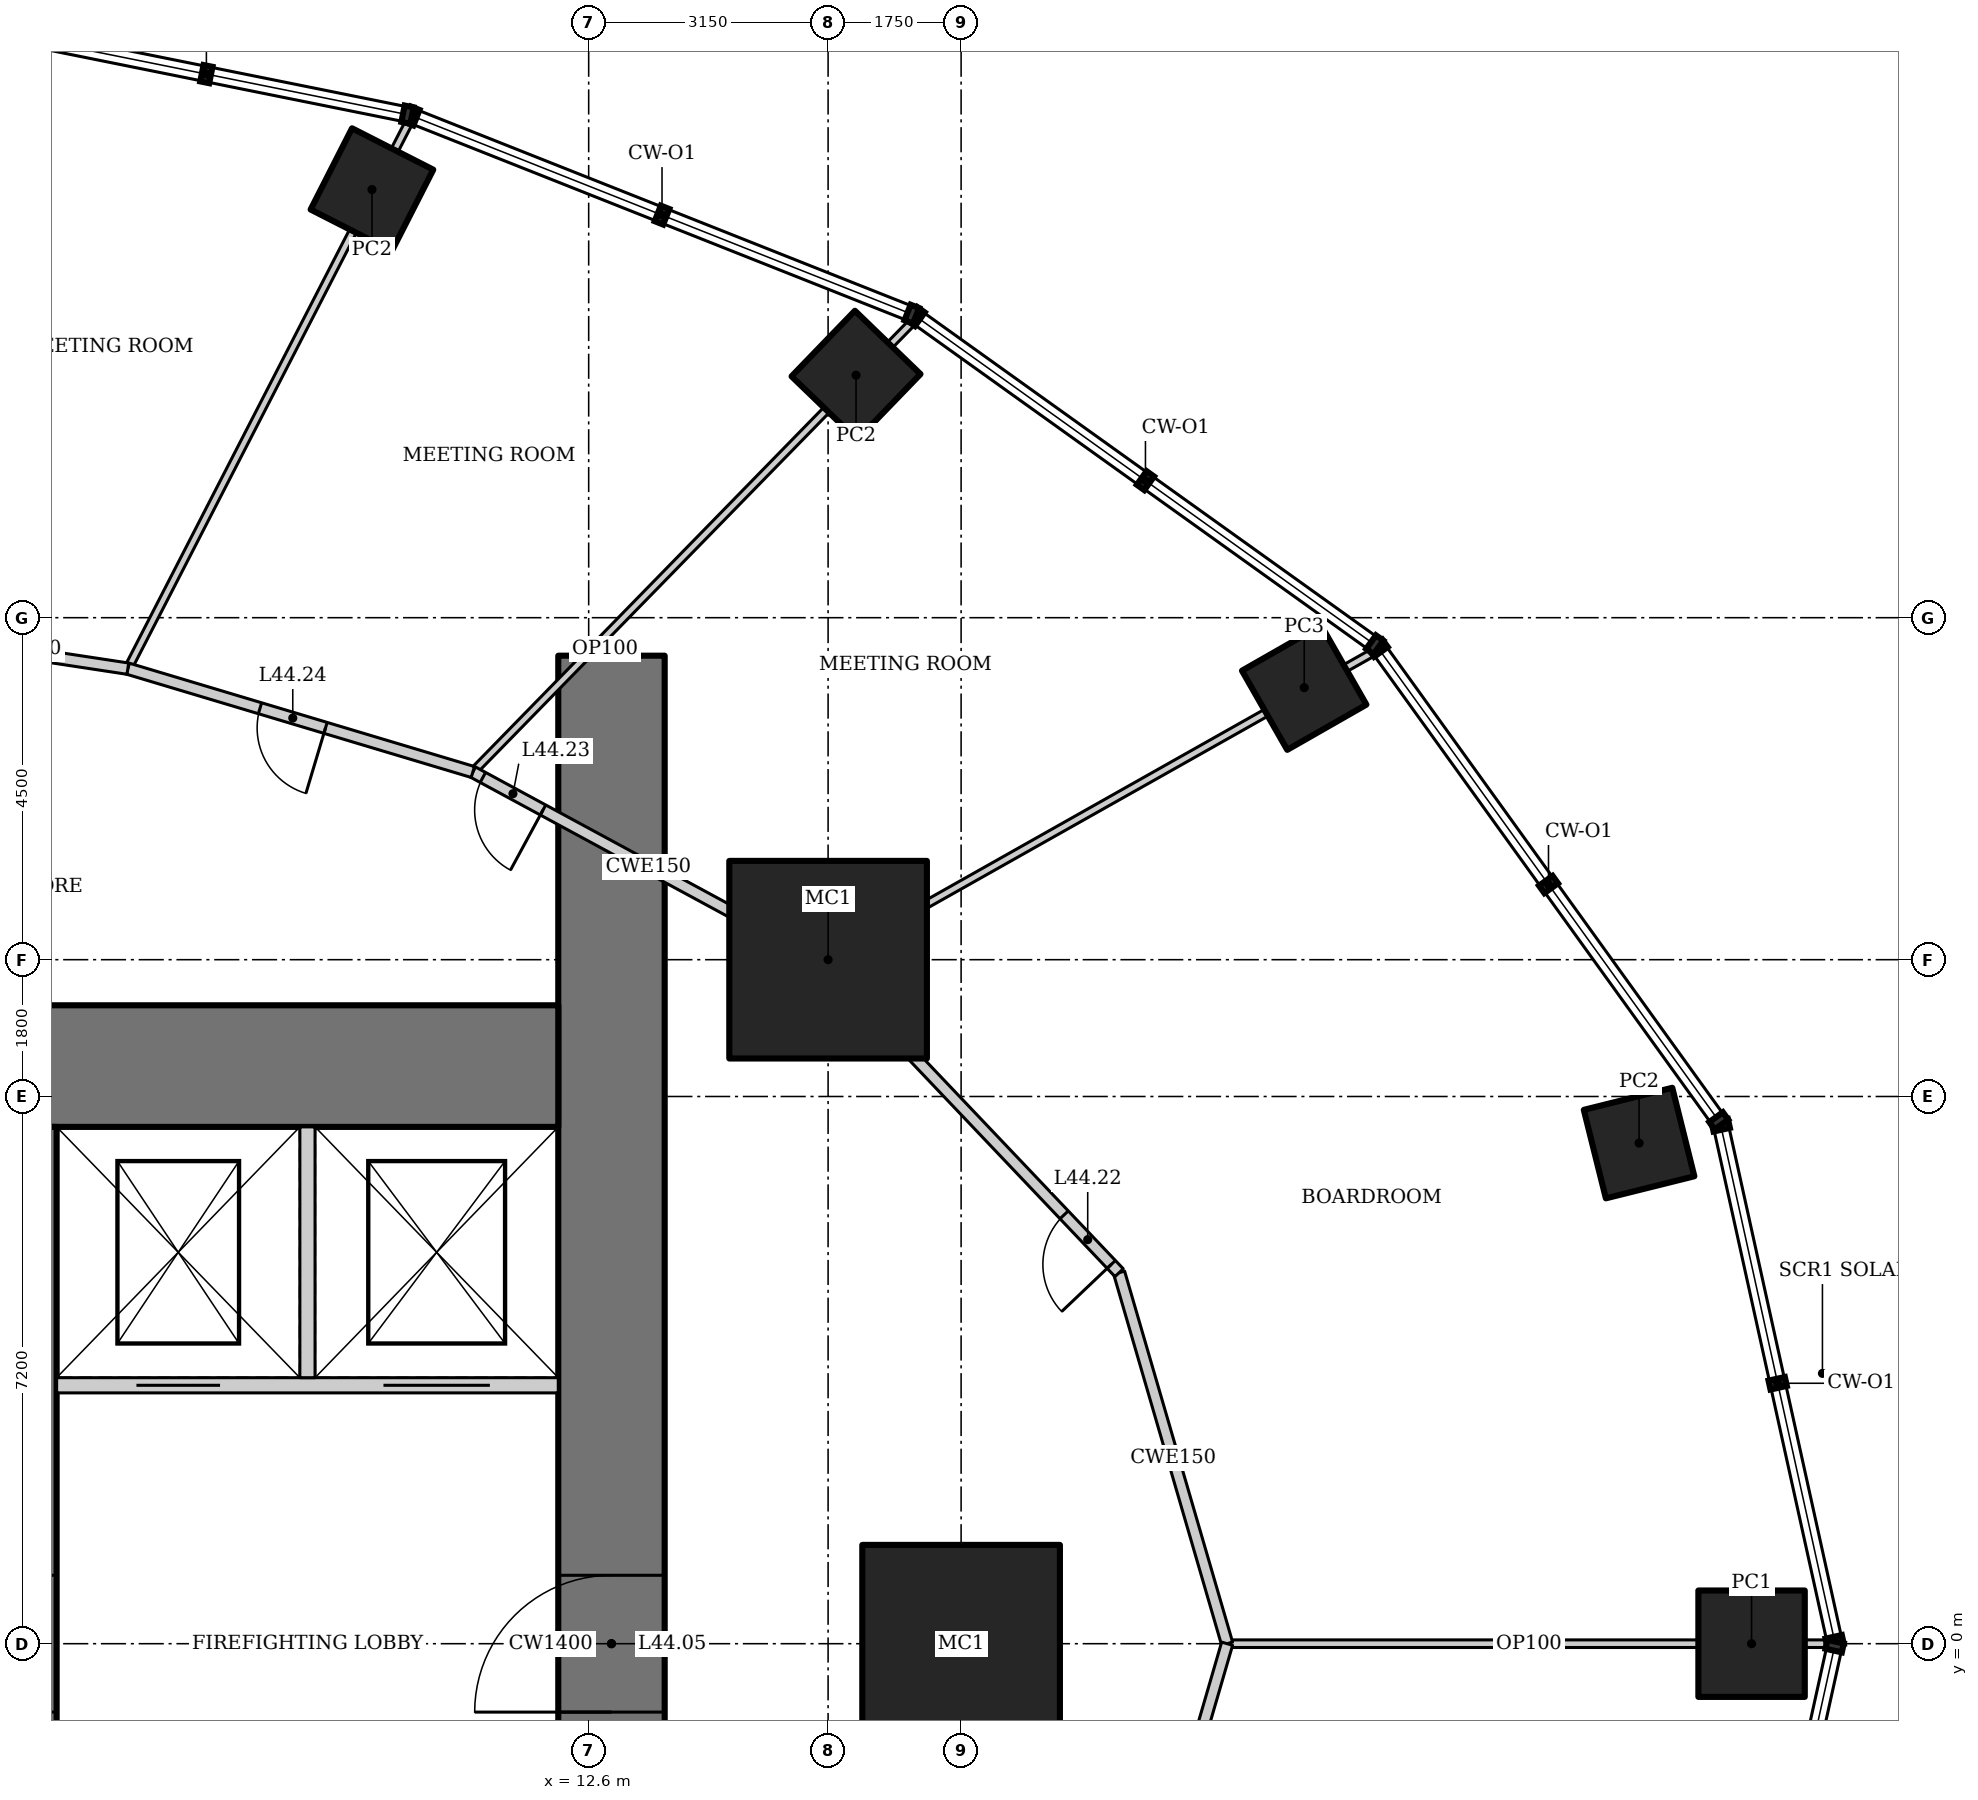
"""IFC4 building model, lengths in metres.
Left out: names, types, materials, properties, quantities, classifications, styles, units other than length and angle.
Written with IfcOpenShell. Run it as: python <this file> out.ifc"""

import sys

from ifc_helpers import new_model, si_unit, direction, frame, frame_2d, origin, origin_2d, place, context, subcontext, project, spatial, rectangle, hollow_rectangle, extrude, element, fill, save


model = new_model("IFC4")
c1 = context("Model", 3, precision=1e-05, world=origin(), true_north=direction((0.0, 1.0)))
c2 = subcontext(c1, "Body", "Model", "MODEL_VIEW")
j1 = project(units=[si_unit("LENGTHUNIT", "METRE"), si_unit("PLANEANGLEUNIT", "RADIAN")], contexts=[c1])
p1 = place(None, origin())
s1 = spatial("IfcSite", under=j1, at=p1, CompositionType="ELEMENT")
p2 = place(p1, origin())
s2 = spatial("IfcBuilding", under=s1, at=p2, CompositionType="ELEMENT")
p3 = place(p2, frame((0.0, 0.0, 188.8)))
s3 = spatial("IfcBuildingStorey", under=s2, at=p3, CompositionType="ELEMENT", Elevation=188.8)
for number, where, z_axis, x_axis in (
    (1, (17.5, 0.0, 0.0), (0.0, 0.0, 1.0), (1.0, 0.0, 0.0)),
    (2, (15.75, 9.0, 0.0), (0.0, 0.0, 1.0), (1.0, 0.0, 0.0)),
):
    element("IfcColumn", number, at=place(p3, frame(where, z_axis=z_axis, x_axis=x_axis)), inside=s3, PredefinedType="COLUMN", context=c2, shape_type="SweptSolid", body=[
        extrude(hollow_rectangle(XDim=2.6, YDim=2.6, WallThickness=0.13, at=origin_2d()), origin(), (0.0, 0.0, 1.0), 4.2),
    ])
p4 = place(p3, frame((27.9, 0.0, 0.0), z_axis=(0.0, 0.0, 1.0), x_axis=(1.0, 0.0, 0.0)))
e3 = element("IfcColumn", 3, at=p4, inside=s3, PredefinedType="COLUMN", context=c2, shape_type="SweptSolid", body=[
    extrude(hollow_rectangle(XDim=1.4, YDim=1.4, WallThickness=0.1, at=origin_2d()), origin(), (0.0, 0.0, 1.0), 2.66),
])
p5 = place(p3, frame((26.42, 6.587, 0.0), z_axis=(0.0, 0.0, 1.0), x_axis=(0.970295726276, 0.2419218956, 0.0)))
e4 = element("IfcColumn", 4, at=p5, inside=s3, PredefinedType="COLUMN", context=c2, shape_type="SweptSolid", body=[
    extrude(hollow_rectangle(XDim=1.2, YDim=1.2, WallThickness=0.1, at=origin_2d()), origin(), (0.0, 0.0, 1.0), 2.88),
])
p6 = place(p3, frame((22.014, 12.579, 0.0), z_axis=(0.0, 0.0, 1.0), x_axis=(0.86824298017, 0.496139221777, 0.0)))
e5 = element("IfcColumn", 5, at=p6, inside=s3, PredefinedType="COLUMN", context=c2, shape_type="SweptSolid", body=[
    extrude(hollow_rectangle(XDim=1.2, YDim=1.2, WallThickness=0.12, at=origin_2d()), origin(), (0.0, 0.0, 1.0), 2.88),
])
for number, where, z_axis, x_axis in (
    (6, (16.118, 16.69, 0.0), (0.0, 0.0, 1.0), (0.695, 0.719, 0.0)),
    (7, (9.749, 19.133, 0.0), (0.0, 0.0, 1.0), (0.454, 0.891, 0.0)),
):
    element("IfcColumn", number, at=place(p3, frame(where, z_axis=z_axis, x_axis=x_axis)), inside=s3, PredefinedType="COLUMN", context=c2, shape_type="SweptSolid", body=[
        extrude(hollow_rectangle(XDim=1.2, YDim=1.2, WallThickness=0.1, at=origin_2d()), origin(), (0.0, 0.0, 1.0), 2.88),
    ])
p7 = place(p3, frame((12.9, -13.0, 0.0), z_axis=(0.0, 0.0, 1.0), x_axis=(0.0, 1.0, 0.0)))
e8 = element("IfcWall", 8, at=p7, inside=s3, PredefinedType="SHEAR", context=c2, shape_type="SweptSolid", body=[
    extrude(rectangle(XDim=26.0, YDim=1.4, at=frame_2d((13.0, 0.0))), origin(), (0.0, 0.0, 1.0), 4.2),
])
p8 = place(p7, frame((12.1, 0.0, 0.0)))
e9 = element("IfcOpeningElement", 9, at=p8, cuts=e8, PredefinedType="OPENING", context=c2, shape_type="SweptSolid", body=[
    extrude(rectangle(XDim=1.8, YDim=2.1, at=frame_2d((0.9, 1.05))), frame((0.0, 0.71, 0.0), z_axis=(0.0, -1.0, 0.0), x_axis=(1.0, 0.0, 0.0)), (0.0, 0.0, 1.0), 1.42),
])
p9 = place(p3, frame((12.2, 7.6, 0.0), z_axis=(0.0, 0.0, 1.0), x_axis=(-1.0, 0.0, 0.0)))
e10 = element("IfcWall", 10, at=p9, inside=s3, PredefinedType="SHEAR", context=c2, shape_type="SweptSolid", body=[
    extrude(rectangle(XDim=24.4, YDim=1.6, at=frame_2d((12.2, 0.0))), origin(), (0.0, 0.0, 1.0), 4.2),
])
p10 = place(p3, frame((5.4, -6.8, 0.0), z_axis=(0.0, 0.0, 1.0), x_axis=(0.0, 1.0, 0.0)))
e11 = element("IfcWall", 11, at=p10, inside=s3, PredefinedType="SHEAR", context=c2, shape_type="SweptSolid", body=[
    extrude(rectangle(XDim=13.6, YDim=0.4, at=frame_2d((6.8, 0.0))), origin(), (0.0, 0.0, 1.0), 4.2),
])
p11 = place(p10, frame((5.9, 0.0, 0.0)))
e12 = element("IfcOpeningElement", 12, at=p11, cuts=e11, PredefinedType="OPENING", context=c2, shape_type="SweptSolid", body=[
    extrude(rectangle(XDim=1.8, YDim=2.1, at=frame_2d((0.9, 1.05))), frame((0.0, 0.21, 0.0), z_axis=(0.0, -1.0, 0.0), x_axis=(1.0, 0.0, 0.0)), (0.0, 0.0, 1.0), 0.42),
])
p12 = place(p3, frame((12.2, 3.4, 0.0), z_axis=(0.0, 0.0, 1.0), x_axis=(-1.0, 0.0, 0.0)))
e13 = element("IfcWall", 13, at=p12, inside=s3, PredefinedType="SOLIDWALL", context=c2, shape_type="SweptSolid", body=[
    extrude(rectangle(XDim=6.6, YDim=0.2, at=frame_2d((3.3, 0.0))), origin(), (0.0, 0.0, 1.0), 4.2),
])
p13 = place(p12, frame((4.45, 0.0, 0.0)))
e14 = element("IfcOpeningElement", 14, at=p13, cuts=e13, PredefinedType="OPENING", context=c2, shape_type="SweptSolid", body=[
    extrude(rectangle(XDim=1.1, YDim=2.2, at=frame_2d((0.55, 1.1))), frame((0.0, 0.11, 0.0), z_axis=(0.0, -1.0, 0.0), x_axis=(1.0, 0.0, 0.0)), (0.0, 0.0, 1.0), 0.22),
])
p14 = place(p12, frame((0.9, 0.0, 0.0)))
e15 = element("IfcOpeningElement", 15, at=p14, cuts=e13, PredefinedType="OPENING", context=c2, shape_type="SweptSolid", body=[
    extrude(rectangle(XDim=1.4, YDim=2.2, at=frame_2d((0.7, 1.1))), frame((0.0, 0.11, 0.0), z_axis=(0.0, -1.0, 0.0), x_axis=(1.0, 0.0, 0.0)), (0.0, 0.0, 1.0), 0.22),
])
p15 = place(p3, frame((8.9, 3.5, 0.0), z_axis=(0.0, 0.0, 1.0), x_axis=(0.0, 1.0, 0.0)))
e16 = element("IfcWall", 16, at=p15, inside=s3, PredefinedType="SOLIDWALL", context=c2, shape_type="SweptSolid", body=[
    extrude(rectangle(XDim=3.3, YDim=0.2, at=frame_2d((1.65, 0.0))), origin(), (0.0, 0.0, 1.0), 4.2),
])
p16 = place(p3, frame((28.944, 0.0, 0.0), z_axis=(0.0, 0.0, 1.0), x_axis=(-1.0, 0.0, 0.0)))
e17 = element("IfcWall", 17, at=p16, inside=s3, PredefinedType="PARTITIONING", context=c2, shape_type="SweptSolid", body=[
    extrude(rectangle(XDim=7.944, YDim=0.1, at=frame_2d((3.972, 0.0))), origin(), (0.0, 0.0, 1.0), 2.8),
])
p17 = place(p3, frame((22.949, 13.059, 0.0), z_axis=(0.0, 0.0, 1.0), x_axis=(-0.871079462611, -0.491142107558, 0.0)))
e18 = element("IfcWall", 18, at=p17, inside=s3, PredefinedType="PARTITIONING", context=c2, shape_type="SweptSolid", body=[
    extrude(rectangle(XDim=8.327, YDim=0.1, at=frame_2d((4.164, 0.0))), origin(), (0.0, 0.0, 1.0), 2.8),
])
p18 = place(p3, frame((16.882, 17.414, 0.0), z_axis=(0.0, 0.0, 1.0), x_axis=(-0.698758056249, -0.715358077348, 0.0)))
e19 = element("IfcWall", 19, at=p18, inside=s3, PredefinedType="PARTITIONING", context=c2, shape_type="SweptSolid", body=[
    extrude(rectangle(XDim=8.31, YDim=0.1, at=frame_2d((4.155, 0.0))), origin(), (0.0, 0.0, 1.0), 3.058),
])
p19 = place(p3, frame((10.253, 20.052, 0.0), z_axis=(0.0, 0.0, 1.0), x_axis=(-0.457535449567, -0.889191381194, 0.0)))
e20 = element("IfcWall", 20, at=p19, inside=s3, PredefinedType="PARTITIONING", context=c2, shape_type="SweptSolid", body=[
    extrude(rectangle(XDim=8.123, YDim=0.1, at=frame_2d((4.061, 0.0))), origin(), (0.0, 0.0, 1.0), 3.228),
])
p20 = place(p3, frame((21.0, 0.0, 0.0), z_axis=(0.0, 0.0, 1.0), x_axis=(-0.279474430869, 0.960153134917, 0.0)))
e21 = element("IfcWall", 21, at=p20, inside=s3, PredefinedType="PARTITIONING", context=c2, shape_type="SweptSolid", body=[
    extrude(rectangle(XDim=5.084, YDim=0.15, at=frame_2d((2.542, 0.0))), origin(), (0.0, 0.0, 1.0), 4.0),
])
p21 = place(p3, frame((19.579, 4.882, 0.0), z_axis=(0.0, 0.0, 1.0), x_axis=(-0.688797257101, 0.72495402517, 0.0)))
e22 = element("IfcWall", 22, at=p21, inside=s3, PredefinedType="PARTITIONING", context=c2, shape_type="SweptSolid", body=[
    extrude(rectangle(XDim=5.638, YDim=0.15, at=frame_2d((2.819, 0.0))), origin(), (0.0, 0.0, 1.0), 4.0),
])
p22 = place(p21, frame((0.15, 0.0, 0.0)))
e23 = element("IfcOpeningElement", 23, at=p22, cuts=e22, PredefinedType="OPENING", context=c2, shape_type="SweptSolid", body=[
    extrude(rectangle(XDim=0.9, YDim=2.1, at=frame_2d((0.45, 1.05))), frame((0.0, 0.085, 0.0), z_axis=(0.0, -1.0, 0.0), x_axis=(1.0, 0.0, 0.0)), (0.0, 0.0, 1.0), 0.17),
])
p23 = place(p3, frame((15.696, 8.969, 0.0), z_axis=(0.0, 0.0, 1.0), x_axis=(-0.879436285334, 0.476016617397, 0.0)))
e24 = element("IfcWall", 24, at=p23, inside=s3, PredefinedType="PARTITIONING", context=c2, shape_type="SweptSolid", body=[
    extrude(rectangle(XDim=5.253, YDim=0.15, at=frame_2d((2.626, 0.0))), origin(), (0.0, 0.0, 1.0), 4.0),
])
p24 = place(p23, frame((4.203, 0.0, 0.0)))
e25 = element("IfcOpeningElement", 25, at=p24, cuts=e24, PredefinedType="OPENING", context=c2, shape_type="SweptSolid", body=[
    extrude(rectangle(XDim=0.9, YDim=2.1, at=frame_2d((0.45, 1.05))), frame((0.0, 0.085, 0.0), z_axis=(0.0, -1.0, 0.0), x_axis=(1.0, 0.0, 0.0)), (0.0, 0.0, 1.0), 0.17),
])
p25 = place(p3, frame((11.076, 11.469, 0.0), z_axis=(0.0, 0.0, 1.0), x_axis=(-0.957933992798, 0.286988615527, 0.0)))
e26 = element("IfcWall", 26, at=p25, inside=s3, PredefinedType="PARTITIONING", context=c2, shape_type="SweptSolid", body=[
    extrude(rectangle(XDim=4.738, YDim=0.15, at=frame_2d((2.369, 0.0))), origin(), (0.0, 0.0, 1.0), 4.0),
])
p26 = place(p25, frame((2.023, 0.0, 0.0)))
e27 = element("IfcOpeningElement", 27, at=p26, cuts=e26, PredefinedType="OPENING", context=c2, shape_type="SweptSolid", body=[
    extrude(rectangle(XDim=0.9, YDim=2.1, at=frame_2d((0.45, 1.05))), frame((0.0, 0.085, 0.0), z_axis=(0.0, -1.0, 0.0), x_axis=(1.0, 0.0, 0.0)), (0.0, 0.0, 1.0), 0.17),
])
p27 = place(p3, frame((6.537, 12.829, 0.0), z_axis=(0.0, 0.0, 1.0), x_axis=(-0.988668719464, 0.150113833987, 0.0)))
e28 = element("IfcWall", 28, at=p27, inside=s3, PredefinedType="PARTITIONING", context=c2, shape_type="SweptSolid", body=[
    extrude(rectangle(XDim=3.493, YDim=0.15, at=frame_2d((1.747, 0.0))), origin(), (0.0, 0.0, 1.0), 4.0),
])
p28 = place(p27, frame((2.444, 0.0, 0.0)))
e29 = element("IfcOpeningElement", 29, at=p28, cuts=e28, PredefinedType="OPENING", context=c2, shape_type="SweptSolid", body=[
    extrude(rectangle(XDim=0.9, YDim=2.1, at=frame_2d((0.45, 1.05))), frame((0.0, 0.085, 0.0), z_axis=(0.0, -1.0, 0.0), x_axis=(1.0, 0.0, 0.0)), (0.0, 0.0, 1.0), 0.17),
])
p29 = place(p3, frame((19.579, -4.882, 0.0), z_axis=(0.0, 0.0, 1.0), x_axis=(0.279474430869, 0.960153134917, 0.0)))
e30 = element("IfcWall", 30, at=p29, inside=s3, PredefinedType="PARTITIONING", context=c2, shape_type="SweptSolid", body=[
    extrude(rectangle(XDim=5.084, YDim=0.15, at=frame_2d((2.542, 0.0))), origin(), (0.0, 0.0, 1.0), 4.0),
])
p30 = place(p3, frame((12.9, 13.0, 0.0), z_axis=(0.0, 0.0, 1.0), x_axis=(-0.714845300066, 0.699282630253, 0.0)))
e31 = element("IfcWall", 31, at=p30, inside=s3, PredefinedType="PARTITIONING", context=c2, shape_type="SweptSolid", body=[
    extrude(rectangle(XDim=0.235, YDim=0.1, at=frame_2d((0.118, 0.0))), origin(), (0.0, 0.0, 1.0), 4.0),
])
p31 = place(p8, origin())
e32 = element("IfcDoor", 32, at=p31, inside=s3, OperationType="DOUBLE_DOOR_DOUBLE_SWING", PredefinedType="DOOR", context=c2, shape_type="SweptSolid", body=[
    extrude(rectangle(XDim=1.8, YDim=2.1, at=frame_2d((0.9, 1.05))), frame((0.0, 0.025, 0.0), z_axis=(0.0, -1.0, 0.0), x_axis=(1.0, 0.0, 0.0)), (0.0, 0.0, 1.0), 0.05),
])
fill(e9, e32)
p32 = place(p13, origin())
e33 = element("IfcDoor", 33, at=p32, inside=s3, OperationType="DOUBLE_DOOR_SLIDING", PredefinedType="DOOR", context=c2, shape_type="SweptSolid", body=[
    extrude(rectangle(XDim=1.1, YDim=2.2, at=frame_2d((0.55, 1.1))), frame((0.0, 0.025, 0.0), z_axis=(0.0, -1.0, 0.0), x_axis=(1.0, 0.0, 0.0)), (0.0, 0.0, 1.0), 0.05),
])
fill(e14, e33)
p33 = place(p14, origin())
e34 = element("IfcDoor", 34, at=p33, inside=s3, OperationType="DOUBLE_DOOR_SLIDING", PredefinedType="DOOR", context=c2, shape_type="SweptSolid", body=[
    extrude(rectangle(XDim=1.4, YDim=2.2, at=frame_2d((0.7, 1.1))), frame((0.0, 0.025, 0.0), z_axis=(0.0, -1.0, 0.0), x_axis=(1.0, 0.0, 0.0)), (0.0, 0.0, 1.0), 0.05),
])
fill(e15, e34)
p34 = place(p22, origin())
e35 = element("IfcDoor", 35, at=p34, inside=s3, OperationType="SINGLE_SWING_LEFT", PredefinedType="DOOR", context=c2, shape_type="SweptSolid", body=[
    extrude(rectangle(XDim=0.9, YDim=2.1, at=frame_2d((0.45, 1.05))), frame((0.0, 0.025, 0.0), z_axis=(0.0, -1.0, 0.0), x_axis=(1.0, 0.0, 0.0)), (0.0, 0.0, 1.0), 0.05),
])
fill(e23, e35)
p35 = place(p24, origin())
e36 = element("IfcDoor", 36, at=p35, inside=s3, OperationType="SINGLE_SWING_LEFT", PredefinedType="DOOR", context=c2, shape_type="SweptSolid", body=[
    extrude(rectangle(XDim=0.9, YDim=2.1, at=frame_2d((0.45, 1.05))), frame((0.0, 0.025, 0.0), z_axis=(0.0, -1.0, 0.0), x_axis=(1.0, 0.0, 0.0)), (0.0, 0.0, 1.0), 0.05),
])
fill(e25, e36)
p36 = place(p26, origin())
e37 = element("IfcDoor", 37, at=p36, inside=s3, OperationType="SINGLE_SWING_LEFT", PredefinedType="DOOR", context=c2, shape_type="SweptSolid", body=[
    extrude(rectangle(XDim=0.9, YDim=2.1, at=frame_2d((0.45, 1.05))), frame((0.0, 0.025, 0.0), z_axis=(0.0, -1.0, 0.0), x_axis=(1.0, 0.0, 0.0)), (0.0, 0.0, 1.0), 0.05),
])
fill(e27, e37)
save(model, sys.argv[1])
